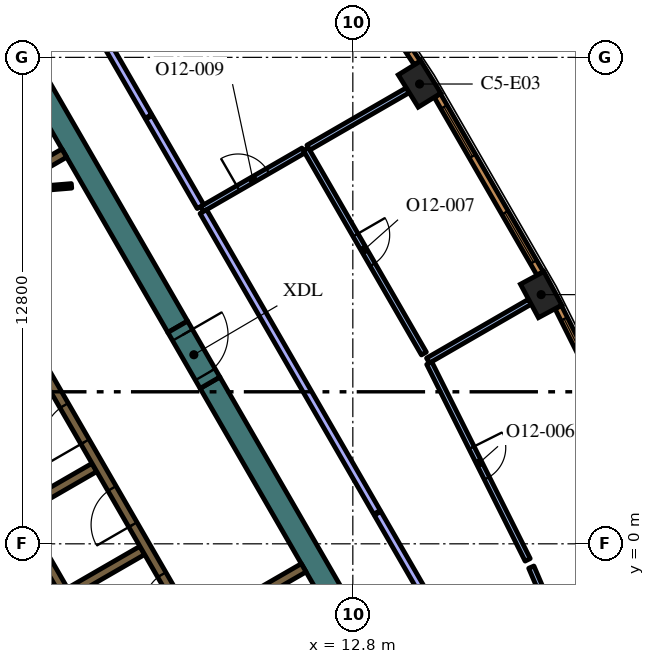
"""IFC4 building model, lengths in metres.
Left out: names, types, materials, properties, quantities, classifications, styles, units other than length and angle.
Written with IfcOpenShell. Run it as: python <this file> out.ifc"""

import sys

from ifc_helpers import new_model, si_unit, direction, frame, frame_2d, origin, origin_2d, place, context, subcontext, project, spatial, polyline, rectangle, outline, extrude, element, fill, save


model = new_model("IFC4")
c1 = context("Model", 3, precision=1e-05, world=origin(), true_north=direction((0.0, 1.0)))
c2 = subcontext(c1, "Body", "Model", "MODEL_VIEW")
j1 = project(units=[si_unit("LENGTHUNIT", "METRE"), si_unit("PLANEANGLEUNIT", "RADIAN")], contexts=[c1])
p1 = place(None, origin())
s1 = spatial("IfcSite", under=j1, at=p1, CompositionType="ELEMENT")
p2 = place(p1, origin())
s2 = spatial("IfcBuilding", under=s1, at=p2, CompositionType="ELEMENT")
p3 = place(p2, frame((0.0, 0.0, 283.8)))
s3 = spatial("IfcBuildingStorey", under=s2, at=p3, CompositionType="ELEMENT", Elevation=283.8)
for number, where, z_axis, x_axis in (
    (1, (17.756, 6.557, 0.0), (0.0, 0.0, 1.0), (-0.474, 0.881, 0.0)),
    (2, (14.556, 12.098, 0.0), (0.0, 0.0, 1.0), (-0.526, 0.851, 0.0)),
):
    element("IfcColumn", number, at=place(p3, frame(where, z_axis=z_axis, x_axis=x_axis)), inside=s3, PredefinedType="COLUMN", context=c2, shape_type="SweptSolid", body=[
        extrude(rectangle(XDim=1.0, YDim=0.7, at=origin_2d()), origin(), (0.0, 0.0, 1.0), 4.2),
    ])
for number, where, z_axis, x_axis in (
    (3, (9.042, 4.239, 0.0), (0.0, 0.0, 1.0), (0.5, -0.866, 0.0)),
    (4, (1.989, 16.456, 0.0), (0.0, 0.0, 1.0), (0.5, -0.866, 0.0)),
):
    element("IfcWall", number, at=place(p3, frame(where, z_axis=z_axis, x_axis=x_axis)), inside=s3, PredefinedType="SOLIDWALL", context=c2, shape_type="SweptSolid", body=[
        extrude(rectangle(XDim=12.406, YDim=0.6, at=frame_2d((6.203, 0.0))), origin(), (0.0, 0.0, 1.0), 4.2),
    ])
p4 = place(p3, origin())
e5 = element("IfcWall", 5, at=p4, inside=s3, PredefinedType="SOLIDWALL", context=c2, shape_type="SweptSolid", body=[
    extrude(outline(polyline([(0.332, 6.925), (0.335, 6.925), (0.335, 6.925), (0.335, 6.925), (0.335, 7.075), (0.335, 7.075), (0.335, 7.075), (0.245, 7.075), (0.035, 7.439), (0.252, 7.564), (0.377, 7.348), (1.512, 5.382), (1.637, 5.165), (2.221, 4.153), (2.771, 3.199), (2.896, 2.983), (3.138, 2.564), (4.031, 1.017), (4.156, 0.801), (5.292, -1.165), (5.417, -1.382), (6.073, -2.519), (6.552, -3.348), (6.677, -3.564), (6.46, -3.689), (0.332, 6.925)])), origin(), (0.0, 0.0, 1.0), 4.2),
])
for number, where, z_axis, x_axis in (
    (6, (4.094, 0.909, 0.0), (0.0, 0.0, 1.0), (0.866, 0.5, 0.0)),
    (7, (5.354, -1.274, 0.0), (0.0, 0.0, 1.0), (0.866, 0.5, 0.0)),
):
    element("IfcWall", number, at=place(p3, frame(where, z_axis=z_axis, x_axis=x_axis)), inside=s3, PredefinedType="SOLIDWALL", context=c2, shape_type="SweptSolid", body=[
        extrude(rectangle(XDim=2.2, YDim=0.25, at=frame_2d((1.1, 0.0))), origin(), (0.0, 0.0, 1.0), 4.2),
    ])
p5 = place(p3, frame((11.507, -0.631, 0.0), z_axis=(0.0, 0.0, 1.0), x_axis=(-0.866011447264, -0.500024172624, 0.0)))
e8 = element("IfcWall", 8, at=p5, inside=s3, PredefinedType="SOLIDWALL", context=c2, shape_type="SweptSolid", body=[
    extrude(rectangle(XDim=5.65, YDim=0.25, at=frame_2d((2.825, 0.0))), origin(), (0.0, 0.0, 1.0), 4.2),
])
p6 = place(p3, frame((3.83, 9.486, 0.0), z_axis=(0.0, 0.0, 1.0), x_axis=(0.865986202621, 0.500067892261, 0.0)))
e9 = element("IfcWall", 9, at=p6, inside=s3, PredefinedType="SOLIDWALL", context=c2, shape_type="SweptSolid", body=[
    extrude(rectangle(XDim=1.591, YDim=0.25, at=frame_2d((0.795, 0.0))), origin(), (0.0, 0.0, 1.0), 4.2),
])
p7 = place(p3, frame((8.565, -2.185, 0.0), z_axis=(0.0, 0.0, 1.0), x_axis=(-0.499997954832, 0.866026584559, 0.0)))
e10 = element("IfcWall", 10, at=p7, inside=s3, PredefinedType="SOLIDWALL", context=c2, shape_type="SweptSolid", body=[
    extrude(rectangle(XDim=12.35, YDim=0.25, at=frame_2d((6.175, 0.0))), origin(), (0.0, 0.0, 1.0), 4.2),
])
p8 = place(p7, frame((0.685, 0.0, 0.0)))
e11 = element("IfcOpeningElement", 11, at=p8, cuts=e10, PredefinedType="OPENING", context=c2, shape_type="SweptSolid", body=[
    extrude(rectangle(XDim=0.9, YDim=2.1, at=frame_2d((0.45, 1.05))), frame((0.0, 0.135, 0.0), z_axis=(0.0, -1.0, 0.0), x_axis=(1.0, 0.0, 0.0)), (0.0, 0.0, 1.0), 0.27),
])
p9 = place(p7, frame((3.105, 0.0, 0.0)))
e12 = element("IfcOpeningElement", 12, at=p9, cuts=e10, PredefinedType="OPENING", context=c2, shape_type="SweptSolid", body=[
    extrude(rectangle(XDim=1.1, YDim=2.1, at=frame_2d((0.55, 1.05))), frame((0.0, 0.135, 0.0), z_axis=(0.0, -1.0, 0.0), x_axis=(1.0, 0.0, 0.0)), (0.0, 0.0, 1.0), 0.27),
])
p10 = place(p7, frame((5.625, 0.0, 0.0)))
e13 = element("IfcOpeningElement", 13, at=p10, cuts=e10, PredefinedType="OPENING", context=c2, shape_type="SweptSolid", body=[
    extrude(rectangle(XDim=1.1, YDim=2.1, at=frame_2d((0.55, 1.05))), frame((0.0, 0.135, 0.0), z_axis=(0.0, -1.0, 0.0), x_axis=(1.0, 0.0, 0.0)), (0.0, 0.0, 1.0), 0.27),
])
p11 = place(p7, frame((8.145, 0.0, 0.0)))
e14 = element("IfcOpeningElement", 14, at=p11, cuts=e10, PredefinedType="OPENING", context=c2, shape_type="SweptSolid", body=[
    extrude(rectangle(XDim=1.1, YDim=2.1, at=frame_2d((0.55, 1.05))), frame((0.0, 0.135, 0.0), z_axis=(0.0, -1.0, 0.0), x_axis=(1.0, 0.0, 0.0)), (0.0, 0.0, 1.0), 0.27),
])
p12 = place(p7, frame((10.665, 0.0, 0.0)))
e15 = element("IfcOpeningElement", 15, at=p12, cuts=e10, PredefinedType="OPENING", context=c2, shape_type="SweptSolid", body=[
    extrude(rectangle(XDim=1.1, YDim=2.1, at=frame_2d((0.55, 1.05))), frame((0.0, 0.135, 0.0), z_axis=(0.0, -1.0, 0.0), x_axis=(1.0, 0.0, 0.0)), (0.0, 0.0, 1.0), 0.27),
])
p13 = place(p3, frame((5.398, 9.419, 0.0), z_axis=(0.0, 0.0, 1.0), x_axis=(-0.996653416376, -0.081743303248, 0.0)))
e16 = element("IfcWall", 16, at=p13, inside=s3, PredefinedType="PARTITIONING", context=c2, shape_type="SweptSolid", body=[
    extrude(rectangle(XDim=2.7, YDim=0.12, at=frame_2d((1.35, 0.0))), origin(), (0.0, 0.0, 1.0), 3.55),
])
p14 = place(p13, frame((1.45, 0.0, 0.0)))
e17 = element("IfcOpeningElement", 17, at=p14, cuts=e16, PredefinedType="OPENING", context=c2, shape_type="SweptSolid", body=[
    extrude(rectangle(XDim=0.9, YDim=2.1, at=frame_2d((0.45, 1.05))), frame((0.0, 0.07, 0.0), z_axis=(0.0, -1.0, 0.0), x_axis=(1.0, 0.0, 0.0)), (0.0, 0.0, 1.0), 0.14),
])
p15 = place(p3, frame((8.192, 5.711, 0.0), z_axis=(0.0, 0.0, 1.0), x_axis=(0.500062241894, -0.865989465428, 0.0)))
e18 = element("IfcWall", 18, at=p15, inside=s3, PredefinedType="SOLIDWALL", context=c2, shape_type="SweptSolid", body=[
    extrude(rectangle(XDim=1.7, YDim=0.6, at=frame_2d((0.85, 0.0))), origin(), (0.0, 0.0, 1.0), 4.2),
])
p16 = place(p15, frame((0.25, 0.0, 0.0)))
e19 = element("IfcOpeningElement", 19, at=p16, cuts=e18, PredefinedType="OPENING", context=c2, shape_type="SweptSolid", body=[
    extrude(rectangle(XDim=1.2, YDim=2.1, at=frame_2d((0.6, 1.05))), frame((0.0, 0.31, 0.0), z_axis=(0.0, -1.0, 0.0), x_axis=(1.0, 0.0, 0.0)), (0.0, 0.0, 1.0), 0.62),
])
p17 = place(p3, frame((14.777, 4.822, 0.0), z_axis=(0.0, 0.0, 1.0), x_axis=(0.865992557167, 0.500056887695, 0.0)))
e20 = element("IfcWall", 20, at=p17, inside=s3, PredefinedType="PARTITIONING", context=c2, shape_type="SweptSolid", body=[
    extrude(rectangle(XDim=3.096, YDim=0.15, at=frame_2d((1.548, 0.0))), origin(), (0.0, 0.0, 1.0), 3.55),
])
p18 = place(p3, frame((18.877, -3.84, 0.0), z_axis=(0.0, 0.0, 1.0), x_axis=(-0.393339985587, 0.919393090978, 0.0)))
e21 = element("IfcWall", 21, at=p18, inside=s3, PredefinedType="PARTITIONING", context=c2, shape_type="SweptSolid", body=[
    extrude(rectangle(XDim=3.51, YDim=0.15, at=frame_2d((1.755, 0.0))), origin(), (0.0, 0.0, 1.0), 3.55),
])
p19 = place(p3, frame((14.811, 4.754, 0.0), z_axis=(0.0, 0.0, 1.0), x_axis=(0.447483524661, -0.894292175498, 0.0)))
e22 = element("IfcWall", 22, at=p19, inside=s3, PredefinedType="PARTITIONING", context=c2, shape_type="SweptSolid", body=[
    extrude(rectangle(XDim=5.788, YDim=0.15, at=frame_2d((2.894, 0.0))), origin(), (0.0, 0.0, 1.0), 3.55),
])
p20 = place(p19, frame((2.488, 0.0, 0.0)))
e23 = element("IfcOpeningElement", 23, at=p20, cuts=e22, PredefinedType="OPENING", context=c2, shape_type="SweptSolid", body=[
    extrude(rectangle(XDim=0.9, YDim=2.1, at=frame_2d((0.45, 1.05))), frame((0.0, 0.085, 0.0), z_axis=(0.0, -1.0, 0.0), x_axis=(1.0, 0.0, 0.0)), (0.0, 0.0, 1.0), 0.17),
])
p21 = place(p3, frame((11.564, 10.387, 0.0), z_axis=(0.0, 0.0, 1.0), x_axis=(0.500002559113, -0.866023926275, 0.0)))
e24 = element("IfcWall", 24, at=p21, inside=s3, PredefinedType="PARTITIONING", context=c2, shape_type="SweptSolid", body=[
    extrude(rectangle(XDim=6.212, YDim=0.15, at=frame_2d((3.106, 0.0))), origin(), (0.0, 0.0, 1.0), 3.55),
])
p22 = place(p21, frame((2.612, 0.0, 0.0)))
e25 = element("IfcOpeningElement", 25, at=p22, cuts=e24, PredefinedType="OPENING", context=c2, shape_type="SweptSolid", body=[
    extrude(rectangle(XDim=0.9, YDim=2.1, at=frame_2d((0.45, 1.05))), frame((0.0, 0.085, 0.0), z_axis=(0.0, -1.0, 0.0), x_axis=(1.0, 0.0, 0.0)), (0.0, 0.0, 1.0), 0.17),
])
p23 = place(p3, frame((11.629, 10.424, 0.0), z_axis=(0.0, 0.0, 1.0), x_axis=(0.866061796884, 0.499936960004, 0.0)))
e26 = element("IfcWall", 26, at=p23, inside=s3, PredefinedType="PARTITIONING", context=c2, shape_type="SweptSolid", body=[
    extrude(rectangle(XDim=3.021, YDim=0.15, at=frame_2d((1.511, 0.0))), origin(), (0.0, 0.0, 1.0), 3.55),
])
p24 = place(p3, frame((8.829, 8.808, 0.0), z_axis=(0.0, 0.0, 1.0), x_axis=(0.866041857893, 0.499971499565, 0.0)))
e27 = element("IfcWall", 27, at=p24, inside=s3, PredefinedType="PARTITIONING", context=c2, shape_type="SweptSolid", body=[
    extrude(rectangle(XDim=3.083, YDim=0.15, at=frame_2d((1.542, 0.0))), origin(), (0.0, 0.0, 1.0), 3.55),
])
p25 = place(p24, frame((1.1, 0.0, 0.0)))
e28 = element("IfcOpeningElement", 28, at=p25, cuts=e27, PredefinedType="OPENING", context=c2, shape_type="SweptSolid", body=[
    extrude(rectangle(XDim=0.9, YDim=2.1, at=frame_2d((0.45, 1.05))), frame((0.0, 0.085, 0.0), z_axis=(0.0, -1.0, 0.0), x_axis=(1.0, 0.0, 0.0)), (0.0, 0.0, 1.0), 0.17),
])
p26 = place(p3, frame((13.436, 0.829, 0.0), z_axis=(0.0, 0.0, 1.0), x_axis=(-0.499983789798, 0.866034762547, 0.0)))
e29 = element("IfcWall", 29, at=p26, inside=s3, PredefinedType="PARTITIONING", context=c2, shape_type="SweptSolid", body=[
    extrude(rectangle(XDim=9.138, YDim=0.2, at=frame_2d((4.569, 0.0))), origin(), (0.0, 0.0, 1.0), 3.55),
])
p27 = place(p3, frame((17.565, -6.324, 0.0), z_axis=(0.0, 0.0, 1.0), x_axis=(-0.499977548053, 0.866038366034, 0.0)))
e30 = element("IfcWall", 30, at=p27, inside=s3, PredefinedType="PARTITIONING", context=c2, shape_type="SweptSolid", body=[
    extrude(rectangle(XDim=8.229, YDim=0.2, at=frame_2d((4.115, 0.0))), origin(), (0.0, 0.0, 1.0), 3.55),
])
p28 = place(p3, frame((8.792, 8.873, 0.0), z_axis=(0.0, 0.0, 1.0), x_axis=(-0.499992600721, 0.866029675718, 0.0)))
e31 = element("IfcWall", 31, at=p28, inside=s3, PredefinedType="PARTITIONING", context=c2, shape_type="SweptSolid", body=[
    extrude(rectangle(XDim=2.712, YDim=0.2, at=frame_2d((1.356, 0.0))), origin(), (0.0, 0.0, 1.0), 3.55),
])
p29 = place(p3, frame((7.421, 11.247, 0.0), z_axis=(0.0, 0.0, 1.0), x_axis=(-0.499999024953, 0.866025966727, 0.0)))
e32 = element("IfcWall", 32, at=p29, inside=s3, PredefinedType="PARTITIONING", context=c2, shape_type="SweptSolid", body=[
    extrude(rectangle(XDim=7.769, YDim=0.2, at=frame_2d((3.884, 0.0))), origin(), (0.0, 0.0, 1.0), 3.55),
])
p30 = place(p3, frame((20.625, 1.392, 0.0), z_axis=(0.0, 0.0, 1.0), x_axis=(-0.447484531401, 0.894291671747, 0.0)))
e33 = element("IfcWall", 33, at=p30, inside=s3, PredefinedType="SOLIDWALL", context=c2, shape_type="SweptSolid", body=[
    extrude(rectangle(XDim=5.406, YDim=0.19, at=frame_2d((2.703, 0.0))), origin(), (0.0, 0.0, 1.0), 3.95),
])
p31 = place(p30, frame((0.346, 0.0, 0.6)))
e34 = element("IfcOpeningElement", 34, at=p31, cuts=e33, PredefinedType="OPENING", context=c2, shape_type="SweptSolid", body=[
    extrude(rectangle(XDim=1.5, YDim=2.85, at=frame_2d((0.75, 1.425))), frame((0.0, 0.105, 0.0), z_axis=(0.0, -1.0, 0.0), x_axis=(1.0, 0.0, 0.0)), (0.0, 0.0, 1.0), 0.21),
])
p32 = place(p30, frame((3.559, 0.0, 0.6)))
e35 = element("IfcOpeningElement", 35, at=p32, cuts=e33, PredefinedType="OPENING", context=c2, shape_type="SweptSolid", body=[
    extrude(rectangle(XDim=1.5, YDim=2.85, at=frame_2d((0.75, 1.425))), frame((0.0, 0.105, 0.0), z_axis=(0.0, -1.0, 0.0), x_axis=(1.0, 0.0, 0.0)), (0.0, 0.0, 1.0), 0.21),
])
p33 = place(p3, frame((17.728, 7.114, 0.0), z_axis=(0.0, 0.0, 1.0), x_axis=(-0.500024767483, 0.866011103799, 0.0)))
e36 = element("IfcWall", 36, at=p33, inside=s3, PredefinedType="SOLIDWALL", context=c2, shape_type="SweptSolid", body=[
    extrude(rectangle(XDim=5.406, YDim=0.19, at=frame_2d((2.703, 0.0))), origin(), (0.0, 0.0, 1.0), 3.95),
])
p34 = place(p33, frame((0.346, 0.0, 0.6)))
e37 = element("IfcOpeningElement", 37, at=p34, cuts=e36, PredefinedType="OPENING", context=c2, shape_type="SweptSolid", body=[
    extrude(rectangle(XDim=1.5, YDim=2.85, at=frame_2d((0.75, 1.425))), frame((0.0, 0.105, 0.0), z_axis=(0.0, -1.0, 0.0), x_axis=(1.0, 0.0, 0.0)), (0.0, 0.0, 1.0), 0.21),
])
p35 = place(p33, frame((3.56, 0.0, 0.6)))
e38 = element("IfcOpeningElement", 38, at=p35, cuts=e36, PredefinedType="OPENING", context=c2, shape_type="SweptSolid", body=[
    extrude(rectangle(XDim=1.5, YDim=2.85, at=frame_2d((0.75, 1.425))), frame((0.0, 0.105, 0.0), z_axis=(0.0, -1.0, 0.0), x_axis=(1.0, 0.0, 0.0)), (0.0, 0.0, 1.0), 0.21),
])
p36 = place(p3, frame((14.496, 12.653, 0.0), z_axis=(0.0, 0.0, 1.0), x_axis=(-0.550744054781, 0.83467417962, 0.0)))
e39 = element("IfcWall", 39, at=p36, inside=s3, PredefinedType="SOLIDWALL", context=c2, shape_type="SweptSolid", body=[
    extrude(rectangle(XDim=5.406, YDim=0.19, at=frame_2d((2.703, 0.0))), origin(), (0.0, 0.0, 1.0), 3.95),
])
p37 = place(p36, frame((0.346, 0.0, 0.6)))
e40 = element("IfcOpeningElement", 40, at=p37, cuts=e39, PredefinedType="OPENING", context=c2, shape_type="SweptSolid", body=[
    extrude(rectangle(XDim=1.5, YDim=2.85, at=frame_2d((0.75, 1.425))), frame((0.0, 0.105, 0.0), z_axis=(0.0, -1.0, 0.0), x_axis=(1.0, 0.0, 0.0)), (0.0, 0.0, 1.0), 0.21),
])
p38 = place(p36, frame((3.559, 0.0, 0.6)))
e41 = element("IfcOpeningElement", 41, at=p38, cuts=e39, PredefinedType="OPENING", context=c2, shape_type="SweptSolid", body=[
    extrude(rectangle(XDim=1.5, YDim=2.85, at=frame_2d((0.75, 1.425))), frame((0.0, 0.105, 0.0), z_axis=(0.0, -1.0, 0.0), x_axis=(1.0, 0.0, 0.0)), (0.0, 0.0, 1.0), 0.21),
])
p39 = place(p8, origin())
e42 = element("IfcDoor", 42, at=p39, inside=s3, OperationType="SINGLE_SWING_LEFT", PredefinedType="DOOR", context=c2, shape_type="SweptSolid", body=[
    extrude(rectangle(XDim=0.9, YDim=2.1, at=frame_2d((0.45, 1.05))), frame((0.0, 0.025, 0.0), z_axis=(0.0, -1.0, 0.0), x_axis=(1.0, 0.0, 0.0)), (0.0, 0.0, 1.0), 0.05),
])
fill(e11, e42)
p40 = place(p9, origin())
e43 = element("IfcDoor", 43, at=p40, inside=s3, OperationType="DOUBLE_DOOR_SLIDING", PredefinedType="DOOR", context=c2, shape_type="SweptSolid", body=[
    extrude(rectangle(XDim=1.1, YDim=2.1, at=frame_2d((0.55, 1.05))), frame((0.0, 0.025, 0.0), z_axis=(0.0, -1.0, 0.0), x_axis=(1.0, 0.0, 0.0)), (0.0, 0.0, 1.0), 0.05),
])
fill(e12, e43)
p41 = place(p10, origin())
e44 = element("IfcDoor", 44, at=p41, inside=s3, OperationType="DOUBLE_DOOR_SLIDING", PredefinedType="DOOR", context=c2, shape_type="SweptSolid", body=[
    extrude(rectangle(XDim=1.1, YDim=2.1, at=frame_2d((0.55, 1.05))), frame((0.0, 0.025, 0.0), z_axis=(0.0, -1.0, 0.0), x_axis=(1.0, 0.0, 0.0)), (0.0, 0.0, 1.0), 0.05),
])
fill(e13, e44)
p42 = place(p16, origin())
e45 = element("IfcDoor", 45, at=p42, inside=s3, OperationType="SINGLE_SWING_LEFT", PredefinedType="DOOR", context=c2, shape_type="SweptSolid", body=[
    extrude(rectangle(XDim=1.2, YDim=2.1, at=frame_2d((0.6, 1.05))), frame((0.0, 0.025, 0.0), z_axis=(0.0, -1.0, 0.0), x_axis=(1.0, 0.0, 0.0)), (0.0, 0.0, 1.0), 0.05),
])
fill(e19, e45)
p43 = place(p20, origin())
e46 = element("IfcDoor", 46, at=p43, inside=s3, OperationType="SINGLE_SWING_RIGHT", PredefinedType="DOOR", context=c2, shape_type="SweptSolid", body=[
    extrude(rectangle(XDim=0.9, YDim=2.1, at=frame_2d((0.45, 1.05))), frame((0.0, 0.025, 0.0), z_axis=(0.0, -1.0, 0.0), x_axis=(1.0, 0.0, 0.0)), (0.0, 0.0, 1.0), 0.05),
])
fill(e23, e46)
p44 = place(p22, origin())
e47 = element("IfcDoor", 47, at=p44, inside=s3, OperationType="SINGLE_SWING_LEFT", PredefinedType="DOOR", context=c2, shape_type="SweptSolid", body=[
    extrude(rectangle(XDim=0.9, YDim=2.1, at=frame_2d((0.45, 1.05))), frame((0.0, 0.025, 0.0), z_axis=(0.0, -1.0, 0.0), x_axis=(1.0, 0.0, 0.0)), (0.0, 0.0, 1.0), 0.05),
])
fill(e25, e47)
p45 = place(p25, origin())
e48 = element("IfcDoor", 48, at=p45, inside=s3, OperationType="SINGLE_SWING_RIGHT", PredefinedType="DOOR", context=c2, shape_type="SweptSolid", body=[
    extrude(rectangle(XDim=0.9, YDim=2.1, at=frame_2d((0.45, 1.05))), frame((0.0, 0.025, 0.0), z_axis=(0.0, -1.0, 0.0), x_axis=(1.0, 0.0, 0.0)), (0.0, 0.0, 1.0), 0.05),
])
fill(e28, e48)
p46 = place(p32, origin())
e49 = element("IfcWindow", 49, at=p46, inside=s3, PartitioningType="SINGLE_PANEL", PredefinedType="WINDOW", context=c2, shape_type="SweptSolid", body=[
    extrude(rectangle(XDim=1.5, YDim=2.85, at=frame_2d((0.75, 1.425))), frame((0.0, 0.045, 0.0), z_axis=(0.0, -1.0, 0.0), x_axis=(1.0, 0.0, 0.0)), (0.0, 0.0, 1.0), 0.06),
])
fill(e35, e49)
p47 = place(p34, origin())
e50 = element("IfcWindow", 50, at=p47, inside=s3, PartitioningType="SINGLE_PANEL", PredefinedType="WINDOW", context=c2, shape_type="SweptSolid", body=[
    extrude(rectangle(XDim=1.5, YDim=2.85, at=frame_2d((0.75, 1.425))), frame((0.0, 0.045, 0.0), z_axis=(0.0, -1.0, 0.0), x_axis=(1.0, 0.0, 0.0)), (0.0, 0.0, 1.0), 0.06),
])
fill(e37, e50)
p48 = place(p35, origin())
e51 = element("IfcWindow", 51, at=p48, inside=s3, PartitioningType="SINGLE_PANEL", PredefinedType="WINDOW", context=c2, shape_type="SweptSolid", body=[
    extrude(rectangle(XDim=1.5, YDim=2.85, at=frame_2d((0.75, 1.425))), frame((0.0, 0.045, 0.0), z_axis=(0.0, -1.0, 0.0), x_axis=(1.0, 0.0, 0.0)), (0.0, 0.0, 1.0), 0.06),
])
fill(e38, e51)
p49 = place(p37, origin())
e52 = element("IfcWindow", 52, at=p49, inside=s3, PartitioningType="SINGLE_PANEL", PredefinedType="WINDOW", context=c2, shape_type="SweptSolid", body=[
    extrude(rectangle(XDim=1.5, YDim=2.85, at=frame_2d((0.75, 1.425))), frame((0.0, 0.045, 0.0), z_axis=(0.0, -1.0, 0.0), x_axis=(1.0, 0.0, 0.0)), (0.0, 0.0, 1.0), 0.06),
])
fill(e40, e52)
save(model, sys.argv[1])
